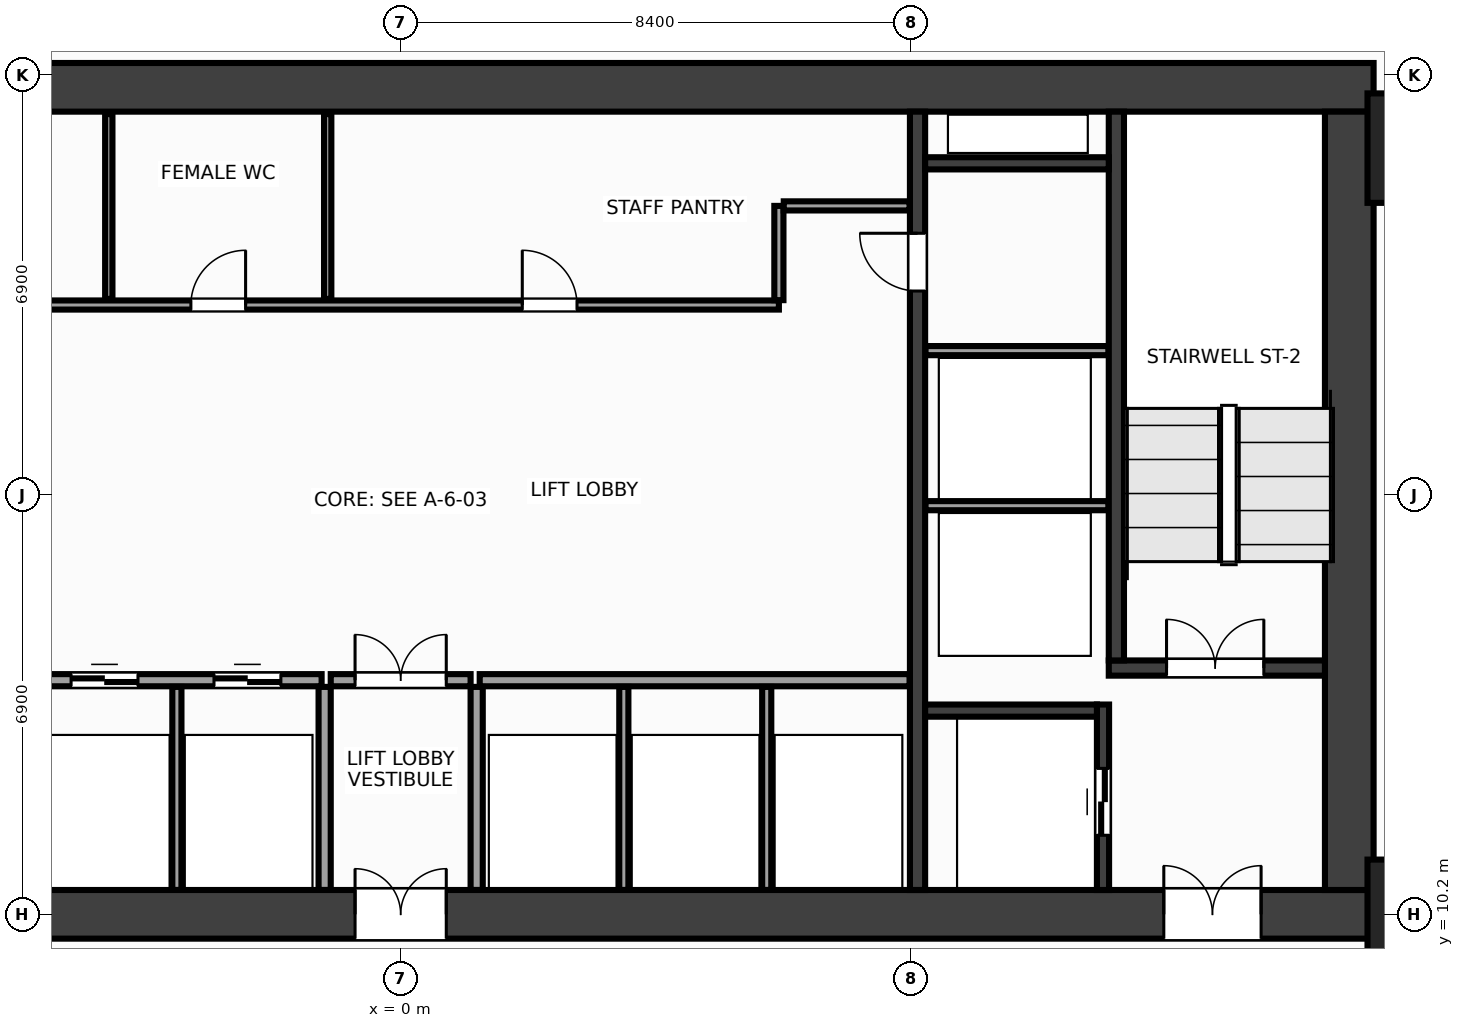
"""IFC4 building model, lengths in metres.
Left out: names, types, materials, properties, quantities, classifications, styles, units other than length and angle.
Written with IfcOpenShell. Run it as: python <this file> out.ifc"""

import sys

from ifc_helpers import new_model, si_unit, direction, frame, frame_2d, origin, origin_2d, place, context, subcontext, project, spatial, rectangle, extrude, source, transform, mapped, element, fill, save


model = new_model("IFC4")
c1 = context("Model", 3, precision=1e-05, world=origin(), true_north=direction((0.0, 1.0)))
c2 = subcontext(c1, "Body", "Model", "MODEL_VIEW")
j1 = project(units=[si_unit("LENGTHUNIT", "METRE"), si_unit("PLANEANGLEUNIT", "RADIAN")], contexts=[c1])
p1 = place(None, origin())
s1 = spatial("IfcSite", under=j1, at=p1, CompositionType="ELEMENT")
p2 = place(p1, origin())
s2 = spatial("IfcBuilding", under=s1, at=p2, CompositionType="ELEMENT")
p3 = place(p2, frame((0.0, 0.0, 30.8)))
s3 = spatial("IfcBuildingStorey", under=s2, at=p3, CompositionType="ELEMENT", Elevation=30.8)
m1 = source(origin(), c2, "Body", "SweptSolid", [
    extrude(rectangle(XDim=32.0, YDim=0.8, at=frame_2d((16.0, 0.0))), origin(), (0.0, 0.0, 1.0), 3.6),
])
p4 = place(p3, frame((-16.0, 23.8, 0.0), z_axis=(0.0, 0.0, 1.0), x_axis=(1.0, 0.0, 0.0)))
e1 = element("IfcWall", 1, at=p4, inside=s3, PredefinedType="SHEAR", context=c2, shape_type="MappedRepresentation", body=[
    mapped(m1, transform((0.0, 0.0, 0.0), x_axis=(1.0, 0.0, 0.0), y_axis=(0.0, 1.0, 0.0), z_axis=(0.0, 0.0, 1.0), scale=1.0)),
])
p5 = place(p3, frame((-16.0, 10.2, 0.0), z_axis=(0.0, 0.0, 1.0), x_axis=(1.0, 0.0, 0.0)))
e2 = element("IfcWall", 2, at=p5, inside=s3, PredefinedType="SHEAR", context=c2, shape_type="MappedRepresentation", body=[
    mapped(m1, transform((0.0, 0.0, 0.0), x_axis=(1.0, 0.0, 0.0), y_axis=(0.0, 1.0, 0.0), z_axis=(0.0, 0.0, 1.0), scale=1.0)),
])
p6 = place(p5, frame((1.85, 0.0, 0.0)))
e3 = element("IfcOpeningElement", 3, at=p6, cuts=e2, PredefinedType="OPENING", context=c2, shape_type="SweptSolid", body=[
    extrude(rectangle(XDim=1.6, YDim=2.15, at=frame_2d((0.8, 1.075))), frame((0.0, 0.412, 0.0), z_axis=(0.0, -1.0, 0.0), x_axis=(1.0, 0.0, 0.0)), (0.0, 0.0, 1.0), 0.824),
])
p7 = place(p5, frame((28.55, 0.0, 0.0)))
e4 = element("IfcOpeningElement", 4, at=p7, cuts=e2, PredefinedType="OPENING", context=c2, shape_type="SweptSolid", body=[
    extrude(rectangle(XDim=1.6, YDim=2.15, at=frame_2d((0.8, 1.075))), frame((0.0, 0.412, 0.0), z_axis=(0.0, -1.0, 0.0), x_axis=(1.0, 0.0, 0.0)), (0.0, 0.0, 1.0), 0.824),
])
p8 = place(p5, frame((15.25, 0.0, 0.0)))
e5 = element("IfcOpeningElement", 5, at=p8, cuts=e2, PredefinedType="OPENING", context=c2, shape_type="SweptSolid", body=[
    extrude(rectangle(XDim=1.5, YDim=2.2, at=frame_2d((0.75, 1.1))), frame((0.0, 0.412, 0.0), z_axis=(0.0, -1.0, 0.0), x_axis=(1.0, 0.0, 0.0)), (0.0, 0.0, 1.0), 0.824),
])
m2 = source(origin(), c2, "Body", "SweptSolid", [
    extrude(rectangle(XDim=12.8, YDim=0.8, at=frame_2d((6.4, 0.0))), origin(), (0.0, 0.0, 1.0), 3.6),
])
p9 = place(p3, frame((15.6, 10.6, 0.0), z_axis=(0.0, 0.0, 1.0), x_axis=(0.0, 1.0, 0.0)))
e6 = element("IfcWall", 6, at=p9, inside=s3, PredefinedType="SHEAR", context=c2, shape_type="MappedRepresentation", body=[
    mapped(m2, transform((0.0, 0.0, 0.0), x_axis=(1.0, 0.0, 0.0), y_axis=(0.0, 1.0, 0.0), z_axis=(0.0, 0.0, 1.0), scale=1.0)),
])
m3 = source(origin(), c2, "Body", "SweptSolid", [
    extrude(rectangle(XDim=12.8, YDim=0.25, at=frame_2d((6.4, 0.0))), origin(), (0.0, 0.0, 1.0), 3.6),
])
p10 = place(p3, frame((8.5, 10.6, 0.0), z_axis=(0.0, 0.0, 1.0), x_axis=(0.0, 1.0, 0.0)))
e7 = element("IfcWall", 7, at=p10, inside=s3, PredefinedType="SHEAR", context=c2, shape_type="MappedRepresentation", body=[
    mapped(m3, transform((0.0, 0.0, 0.0), x_axis=(1.0, 0.0, 0.0), y_axis=(0.0, 1.0, 0.0), z_axis=(0.0, 0.0, 1.0), scale=1.0)),
])
p11 = place(p10, frame((9.85, 0.0, 0.0)))
e8 = element("IfcOpeningElement", 8, at=p11, cuts=e7, PredefinedType="OPENING", context=c2, shape_type="SweptSolid", body=[
    extrude(rectangle(XDim=0.95, YDim=2.15, at=frame_2d((0.475, 1.075))), frame((0.0, 0.137, 0.0), z_axis=(0.0, -1.0, 0.0), x_axis=(1.0, 0.0, 0.0)), (0.0, 0.0, 1.0), 0.274),
])
m4 = source(origin(), c2, "Body", "SweptSolid", [
    extrude(rectangle(XDim=3.555, YDim=0.25, at=frame_2d((1.777, 0.0))), origin(), (0.0, 0.0, 1.0), 3.6),
])
p12 = place(p3, frame((11.645, 14.25, 0.0), z_axis=(0.0, 0.0, 1.0), x_axis=(1.0, 0.0, 0.0)))
e9 = element("IfcWall", 9, at=p12, inside=s3, PredefinedType="SHEAR", context=c2, shape_type="MappedRepresentation", body=[
    mapped(m4, transform((0.0, 0.0, 0.0), x_axis=(1.0, 0.0, 0.0), y_axis=(0.0, 1.0, 0.0), z_axis=(0.0, 0.0, 1.0), scale=1.0)),
])
p13 = place(p12, frame((0.95, 0.0, 0.0)))
e10 = element("IfcOpeningElement", 10, at=p13, cuts=e9, PredefinedType="OPENING", context=c2, shape_type="SweptSolid", body=[
    extrude(rectangle(XDim=1.6, YDim=2.15, at=frame_2d((0.8, 1.075))), frame((0.0, 0.137, 0.0), z_axis=(0.0, -1.0, 0.0), x_axis=(1.0, 0.0, 0.0)), (0.0, 0.0, 1.0), 0.274),
])
m5 = source(origin(), c2, "Body", "SweptSolid", [
    extrude(rectangle(XDim=9.025, YDim=0.25, at=frame_2d((4.512, 0.0))), origin(), (0.0, 0.0, 1.0), 3.6),
])
p14 = place(p3, frame((11.77, 14.375, 0.0), z_axis=(0.0, 0.0, 1.0), x_axis=(0.0, 1.0, 0.0)))
e11 = element("IfcWall", 11, at=p14, inside=s3, PredefinedType="SHEAR", context=c2, shape_type="MappedRepresentation", body=[
    mapped(m5, transform((0.0, 0.0, 0.0), x_axis=(1.0, 0.0, 0.0), y_axis=(0.0, 1.0, 0.0), z_axis=(0.0, 0.0, 1.0), scale=1.0)),
])
m6 = source(origin(), c2, "Body", "SweptSolid", [
    extrude(rectangle(XDim=3.05, YDim=0.2, at=frame_2d((1.525, 0.0))), origin(), (0.0, 0.0, 1.0), 3.6),
])
p15 = place(p3, frame((11.55, 10.6, 0.0), z_axis=(0.0, 0.0, 1.0), x_axis=(0.0, 1.0, 0.0)))
e12 = element("IfcWall", 12, at=p15, inside=s3, PredefinedType="SHEAR", context=c2, shape_type="MappedRepresentation", body=[
    mapped(m6, transform((0.0, 0.0, 0.0), x_axis=(1.0, 0.0, 0.0), y_axis=(0.0, 1.0, 0.0), z_axis=(0.0, 0.0, 1.0), scale=1.0)),
])
p16 = place(p15, frame((0.9, 0.0, 0.0)))
e13 = element("IfcOpeningElement", 13, at=p16, cuts=e12, PredefinedType="OPENING", context=c2, shape_type="SweptSolid", body=[
    extrude(rectangle(XDim=1.1, YDim=2.15, at=frame_2d((0.55, 1.075))), frame((0.0, 0.112, 0.0), z_axis=(0.0, -1.0, 0.0), x_axis=(1.0, 0.0, 0.0)), (0.0, 0.0, 1.0), 0.224),
])
m7 = source(origin(), c2, "Body", "SweptSolid", [
    extrude(rectangle(XDim=2.825, YDim=0.2, at=frame_2d((1.413, 0.0))), origin(), (0.0, 0.0, 1.0), 3.6),
])
p17 = place(p3, frame((8.625, 13.55, 0.0), z_axis=(0.0, 0.0, 1.0), x_axis=(1.0, 0.0, 0.0)))
e14 = element("IfcWall", 14, at=p17, inside=s3, PredefinedType="SHEAR", context=c2, shape_type="MappedRepresentation", body=[
    mapped(m7, transform((0.0, 0.0, 0.0), x_axis=(1.0, 0.0, 0.0), y_axis=(0.0, 1.0, 0.0), z_axis=(0.0, 0.0, 1.0), scale=1.0)),
])
m8 = source(origin(), c2, "Body", "SweptSolid", [
    extrude(rectangle(XDim=3.02, YDim=0.2, at=frame_2d((1.51, 0.0))), origin(), (0.0, 0.0, 1.0), 3.6),
])
p18 = place(p3, frame((8.625, 22.55, 0.0), z_axis=(0.0, 0.0, 1.0), x_axis=(1.0, 0.0, 0.0)))
e15 = element("IfcWall", 15, at=p18, inside=s3, PredefinedType="SHEAR", context=c2, shape_type="MappedRepresentation", body=[
    mapped(m8, transform((0.0, 0.0, 0.0), x_axis=(1.0, 0.0, 0.0), y_axis=(0.0, 1.0, 0.0), z_axis=(0.0, 0.0, 1.0), scale=1.0)),
])
m9 = source(origin(), c2, "Body", "SweptSolid", [
    extrude(rectangle(XDim=1.8, YDim=1.8, at=origin_2d()), origin(), (0.0, 0.0, 1.0), 3.6),
])
for number, where, z_axis, x_axis in (
    (16, (16.8, 10.2, 0.0), (0.0, 0.0, 1.0), (1.0, 0.0, 0.0)),
    (17, (16.8, 22.8, 0.0), (0.0, 0.0, 1.0), (1.0, 0.0, 0.0)),
):
    element("IfcColumn", number, at=place(p3, frame(where, z_axis=z_axis, x_axis=x_axis)), inside=s3, PredefinedType="COLUMN", context=c2, shape_type="MappedRepresentation", body=[
        mapped(m9, transform((0.0, 0.0, 0.0), x_axis=(1.0, 0.0, 0.0), y_axis=(0.0, 1.0, 0.0), z_axis=(0.0, 0.0, 1.0), scale=1.0)),
    ])
m10 = source(origin(), c2, "Body", "SweptSolid", [
    extrude(rectangle(XDim=3.01, YDim=0.15, at=frame_2d((1.505, 0.0))), origin(), (0.0, 0.0, 1.0), 3.36),
])
for number, where, z_axis, x_axis in (
    (18, (8.63, 16.92, 0.0), (0.0, 0.0, 1.0), (1.0, 0.0, 0.0)),
    (19, (8.63, 19.47, 0.0), (0.0, 0.0, 1.0), (1.0, 0.0, 0.0)),
):
    element("IfcWall", number, at=place(p3, frame(where, z_axis=z_axis, x_axis=x_axis)), inside=s3, PredefinedType="PARTITIONING", context=c2, shape_type="MappedRepresentation", body=[
        mapped(m10, transform((0.0, 0.0, 0.0), x_axis=(1.0, 0.0, 0.0), y_axis=(0.0, 1.0, 0.0), z_axis=(0.0, 0.0, 1.0), scale=1.0)),
    ])
m11 = source(origin(), c2, "Body", "SweptSolid", [
    extrude(rectangle(XDim=7.07, YDim=0.2, at=frame_2d((3.535, 0.0))), origin(), (0.0, 0.0, 1.0), 3.36),
])
p19 = place(p3, frame((-8.37, 14.05, 0.0), z_axis=(0.0, 0.0, 1.0), x_axis=(1.0, 0.0, 0.0)))
e20 = element("IfcWall", 20, at=p19, inside=s3, PredefinedType="PARTITIONING", context=c2, shape_type="MappedRepresentation", body=[
    mapped(m11, transform((0.0, 0.0, 0.0), x_axis=(1.0, 0.0, 0.0), y_axis=(0.0, 1.0, 0.0), z_axis=(0.0, 0.0, 1.0), scale=1.0)),
])
p20 = place(p19, frame((0.6, 0.0, 0.0)))
e21 = element("IfcOpeningElement", 21, at=p20, cuts=e20, PredefinedType="OPENING", context=c2, shape_type="SweptSolid", body=[
    extrude(rectangle(XDim=1.1, YDim=2.15, at=frame_2d((0.55, 1.075))), frame((0.0, 0.112, 0.0), z_axis=(0.0, -1.0, 0.0), x_axis=(1.0, 0.0, 0.0)), (0.0, 0.0, 1.0), 0.224),
])
p21 = place(p19, frame((2.95, 0.0, 0.0)))
e22 = element("IfcOpeningElement", 22, at=p21, cuts=e20, PredefinedType="OPENING", context=c2, shape_type="SweptSolid", body=[
    extrude(rectangle(XDim=1.1, YDim=2.15, at=frame_2d((0.55, 1.075))), frame((0.0, 0.112, 0.0), z_axis=(0.0, -1.0, 0.0), x_axis=(1.0, 0.0, 0.0)), (0.0, 0.0, 1.0), 0.224),
])
p22 = place(p19, frame((5.3, 0.0, 0.0)))
e23 = element("IfcOpeningElement", 23, at=p22, cuts=e20, PredefinedType="OPENING", context=c2, shape_type="SweptSolid", body=[
    extrude(rectangle(XDim=1.1, YDim=2.15, at=frame_2d((0.55, 1.075))), frame((0.0, 0.112, 0.0), z_axis=(0.0, -1.0, 0.0), x_axis=(1.0, 0.0, 0.0)), (0.0, 0.0, 1.0), 0.224),
])
p23 = place(p3, frame((1.3, 14.05, 0.0), z_axis=(0.0, 0.0, 1.0), x_axis=(1.0, 0.0, 0.0)))
e24 = element("IfcWall", 24, at=p23, inside=s3, PredefinedType="PARTITIONING", context=c2, shape_type="MappedRepresentation", body=[
    mapped(m11, transform((0.0, 0.0, 0.0), x_axis=(1.0, 0.0, 0.0), y_axis=(0.0, 1.0, 0.0), z_axis=(0.0, 0.0, 1.0), scale=1.0)),
])
m12 = source(origin(), c2, "Body", "SweptSolid", [
    extrude(rectangle(XDim=3.34, YDim=0.2, at=frame_2d((1.67, 0.0))), origin(), (0.0, 0.0, 1.0), 3.36),
])
for number, where, z_axis, x_axis in (
    (25, (-1.25, 10.6, 0.0), (0.0, 0.0, 1.0), (0.0, 1.0, 0.0)),
    (26, (1.25, 10.6, 0.0), (0.0, 0.0, 1.0), (0.0, 1.0, 0.0)),
):
    element("IfcWall", number, at=place(p3, frame(where, z_axis=z_axis, x_axis=x_axis)), inside=s3, PredefinedType="PARTITIONING", context=c2, shape_type="MappedRepresentation", body=[
        mapped(m12, transform((0.0, 0.0, 0.0), x_axis=(1.0, 0.0, 0.0), y_axis=(0.0, 1.0, 0.0), z_axis=(0.0, 0.0, 1.0), scale=1.0)),
    ])
m13 = source(origin(), c2, "Body", "SweptSolid", [
    extrude(rectangle(XDim=2.3, YDim=0.2, at=frame_2d((1.15, 0.0))), origin(), (0.0, 0.0, 1.0), 3.36),
])
p24 = place(p3, frame((-1.15, 14.05, 0.0), z_axis=(0.0, 0.0, 1.0), x_axis=(1.0, 0.0, 0.0)))
e27 = element("IfcWall", 27, at=p24, inside=s3, PredefinedType="PARTITIONING", context=c2, shape_type="MappedRepresentation", body=[
    mapped(m13, transform((0.0, 0.0, 0.0), x_axis=(1.0, 0.0, 0.0), y_axis=(0.0, 1.0, 0.0), z_axis=(0.0, 0.0, 1.0), scale=1.0)),
])
p25 = place(p24, frame((0.4, 0.0, 0.0)))
e28 = element("IfcOpeningElement", 28, at=p25, cuts=e27, PredefinedType="OPENING", context=c2, shape_type="SweptSolid", body=[
    extrude(rectangle(XDim=1.5, YDim=2.2, at=frame_2d((0.75, 1.1))), frame((0.0, 0.112, 0.0), z_axis=(0.0, -1.0, 0.0), x_axis=(1.0, 0.0, 0.0)), (0.0, 0.0, 1.0), 0.224),
])
m14 = source(origin(), c2, "Body", "SweptSolid", [
    extrude(rectangle(XDim=14.59, YDim=0.15, at=frame_2d((7.295, 0.0))), origin(), (0.0, 0.0, 1.0), 3.36),
])
p26 = place(p3, frame((-8.37, 20.22, 0.0), z_axis=(0.0, 0.0, 1.0), x_axis=(1.0, 0.0, 0.0)))
e29 = element("IfcWall", 29, at=p26, inside=s3, PredefinedType="PARTITIONING", context=c2, shape_type="MappedRepresentation", body=[
    mapped(m14, transform((0.0, 0.0, 0.0), x_axis=(1.0, 0.0, 0.0), y_axis=(0.0, 1.0, 0.0), z_axis=(0.0, 0.0, 1.0), scale=1.0)),
])
p27 = place(p26, frame((1.36, 0.0, 0.0)))
e30 = element("IfcOpeningElement", 30, at=p27, cuts=e29, PredefinedType="OPENING", context=c2, shape_type="SweptSolid", body=[
    extrude(rectangle(XDim=0.9, YDim=2.15, at=frame_2d((0.45, 1.075))), frame((0.0, 0.087, 0.0), z_axis=(0.0, -1.0, 0.0), x_axis=(1.0, 0.0, 0.0)), (0.0, 0.0, 1.0), 0.174),
])
p28 = place(p26, frame((4.92, 0.0, 0.0)))
e31 = element("IfcOpeningElement", 31, at=p28, cuts=e29, PredefinedType="OPENING", context=c2, shape_type="SweptSolid", body=[
    extrude(rectangle(XDim=0.9, YDim=2.15, at=frame_2d((0.45, 1.075))), frame((0.0, 0.087, 0.0), z_axis=(0.0, -1.0, 0.0), x_axis=(1.0, 0.0, 0.0)), (0.0, 0.0, 1.0), 0.174),
])
p29 = place(p26, frame((10.37, 0.0, 0.0)))
e32 = element("IfcOpeningElement", 32, at=p29, cuts=e29, PredefinedType="OPENING", context=c2, shape_type="SweptSolid", body=[
    extrude(rectangle(XDim=0.9, YDim=2.15, at=frame_2d((0.45, 1.075))), frame((0.0, 0.087, 0.0), z_axis=(0.0, -1.0, 0.0), x_axis=(1.0, 0.0, 0.0)), (0.0, 0.0, 1.0), 0.174),
])
m15 = source(origin(), c2, "Body", "SweptSolid", [
    extrude(rectangle(XDim=1.55, YDim=0.15, at=frame_2d((0.775, 0.0))), origin(), (0.0, 0.0, 1.0), 3.36),
])
p30 = place(p3, frame((6.22, 20.3, 0.0), z_axis=(0.0, 0.0, 1.0), x_axis=(0.0, 1.0, 0.0)))
e33 = element("IfcWall", 33, at=p30, inside=s3, PredefinedType="PARTITIONING", context=c2, shape_type="MappedRepresentation", body=[
    mapped(m15, transform((0.0, 0.0, 0.0), x_axis=(1.0, 0.0, 0.0), y_axis=(0.0, 1.0, 0.0), z_axis=(0.0, 0.0, 1.0), scale=1.0)),
])
m16 = source(origin(), c2, "Body", "SweptSolid", [
    extrude(rectangle(XDim=2.07, YDim=0.15, at=frame_2d((1.035, 0.0))), origin(), (0.0, 0.0, 1.0), 3.36),
])
p31 = place(p3, frame((6.3, 21.85, 0.0), z_axis=(0.0, 0.0, 1.0), x_axis=(1.0, 0.0, 0.0)))
e34 = element("IfcWall", 34, at=p31, inside=s3, PredefinedType="PARTITIONING", context=c2, shape_type="MappedRepresentation", body=[
    mapped(m16, transform((0.0, 0.0, 0.0), x_axis=(1.0, 0.0, 0.0), y_axis=(0.0, 1.0, 0.0), z_axis=(0.0, 0.0, 1.0), scale=1.0)),
])
m17 = source(origin(), c2, "Body", "SweptSolid", [
    extrude(rectangle(XDim=3.34, YDim=0.15, at=frame_2d((1.67, 0.0))), origin(), (0.0, 0.0, 1.0), 3.36),
])
for number, where, z_axis, x_axis in (
    (35, (-3.68, 10.6, 0.0), (0.0, 0.0, 1.0), (0.0, 1.0, 0.0)),
    (36, (3.67, 10.6, 0.0), (0.0, 0.0, 1.0), (0.0, 1.0, 0.0)),
    (37, (6.02, 10.6, 0.0), (0.0, 0.0, 1.0), (0.0, 1.0, 0.0)),
):
    element("IfcWall", number, at=place(p3, frame(where, z_axis=z_axis, x_axis=x_axis)), inside=s3, PredefinedType="PARTITIONING", context=c2, shape_type="MappedRepresentation", body=[
        mapped(m17, transform((0.0, 0.0, 0.0), x_axis=(1.0, 0.0, 0.0), y_axis=(0.0, 1.0, 0.0), z_axis=(0.0, 0.0, 1.0), scale=1.0)),
    ])
m18 = source(origin(), c2, "Body", "SweptSolid", [
    extrude(rectangle(XDim=3.04, YDim=0.12, at=frame_2d((1.52, 0.0))), origin(), (0.0, 0.0, 1.0), 3.36),
])
for number, where, z_axis, x_axis in (
    (38, (-4.8, 20.32, 0.0), (0.0, 0.0, 1.0), (0.0, 1.0, 0.0)),
    (39, (-1.2, 20.32, 0.0), (0.0, 0.0, 1.0), (0.0, 1.0, 0.0)),
):
    element("IfcWall", number, at=place(p3, frame(where, z_axis=z_axis, x_axis=x_axis)), inside=s3, PredefinedType="PARTITIONING", context=c2, shape_type="MappedRepresentation", body=[
        mapped(m18, transform((0.0, 0.0, 0.0), x_axis=(1.0, 0.0, 0.0), y_axis=(0.0, 1.0, 0.0), z_axis=(0.0, 0.0, 1.0), scale=1.0)),
    ])
m19 = source(origin(), c2, "Body", "SweptSolid", [
    extrude(rectangle(XDim=1.6, YDim=2.15, at=frame_2d((0.8, 1.075))), frame((0.0, 0.025, 0.0), z_axis=(0.0, -1.0, 0.0), x_axis=(1.0, 0.0, 0.0)), (0.0, 0.0, 1.0), 0.05),
])
p32 = place(p13, origin())
e40 = element("IfcDoor", 40, at=p32, inside=s3, OperationType="DOUBLE_DOOR_SINGLE_SWING", PredefinedType="DOOR", context=c2, shape_type="MappedRepresentation", body=[
    mapped(m19, transform((0.0, 0.0, 0.0), x_axis=(1.0, 0.0, 0.0), y_axis=(0.0, 1.0, 0.0), z_axis=(0.0, 0.0, 1.0), scale=1.0)),
])
fill(e10, e40)
p33 = place(p7, origin())
e41 = element("IfcDoor", 41, at=p33, inside=s3, OperationType="DOUBLE_DOOR_SINGLE_SWING", PredefinedType="DOOR", context=c2, shape_type="MappedRepresentation", body=[
    mapped(m19, transform((0.0, 0.0, 0.0), x_axis=(1.0, 0.0, 0.0), y_axis=(0.0, 1.0, 0.0), z_axis=(0.0, 0.0, 1.0), scale=1.0)),
])
fill(e4, e41)
m20 = source(origin(), c2, "Body", "SweptSolid", [
    extrude(rectangle(XDim=1.1, YDim=2.15, at=frame_2d((0.55, 1.075))), frame((0.0, 0.025, 0.0), z_axis=(0.0, -1.0, 0.0), x_axis=(1.0, 0.0, 0.0)), (0.0, 0.0, 1.0), 0.05),
])
p34 = place(p16, origin())
e42 = element("IfcDoor", 42, at=p34, inside=s3, OperationType="DOUBLE_DOOR_SLIDING", PredefinedType="DOOR", context=c2, shape_type="MappedRepresentation", body=[
    mapped(m20, transform((0.0, 0.0, 0.0), x_axis=(1.0, 0.0, 0.0), y_axis=(0.0, 1.0, 0.0), z_axis=(0.0, 0.0, 1.0), scale=1.0)),
])
fill(e13, e42)
m21 = source(origin(), c2, "Body", "SweptSolid", [
    extrude(rectangle(XDim=0.95, YDim=2.15, at=frame_2d((0.475, 1.075))), frame((0.0, 0.025, 0.0), z_axis=(0.0, -1.0, 0.0), x_axis=(1.0, 0.0, 0.0)), (0.0, 0.0, 1.0), 0.05),
])
p35 = place(p11, origin())
e43 = element("IfcDoor", 43, at=p35, inside=s3, OperationType="SINGLE_SWING_RIGHT", PredefinedType="DOOR", context=c2, shape_type="MappedRepresentation", body=[
    mapped(m21, transform((0.0, 0.0, 0.0), x_axis=(1.0, 0.0, 0.0), y_axis=(0.0, 1.0, 0.0), z_axis=(0.0, 0.0, 1.0), scale=1.0)),
])
fill(e8, e43)
p36 = place(p21, origin())
e44 = element("IfcDoor", 44, at=p36, inside=s3, OperationType="DOUBLE_DOOR_SLIDING", PredefinedType="DOOR", context=c2, shape_type="MappedRepresentation", body=[
    mapped(m20, transform((0.0, 0.0, 0.0), x_axis=(1.0, 0.0, 0.0), y_axis=(0.0, 1.0, 0.0), z_axis=(0.0, 0.0, 1.0), scale=1.0)),
])
fill(e22, e44)
p37 = place(p22, origin())
e45 = element("IfcDoor", 45, at=p37, inside=s3, OperationType="DOUBLE_DOOR_SLIDING", PredefinedType="DOOR", context=c2, shape_type="MappedRepresentation", body=[
    mapped(m20, transform((0.0, 0.0, 0.0), x_axis=(1.0, 0.0, 0.0), y_axis=(0.0, 1.0, 0.0), z_axis=(0.0, 0.0, 1.0), scale=1.0)),
])
fill(e23, e45)
m22 = source(origin(), c2, "Body", "SweptSolid", [
    extrude(rectangle(XDim=1.5, YDim=2.2, at=frame_2d((0.75, 1.1))), frame((0.0, 0.025, 0.0), z_axis=(0.0, -1.0, 0.0), x_axis=(1.0, 0.0, 0.0)), (0.0, 0.0, 1.0), 0.05),
])
p38 = place(p25, origin())
e46 = element("IfcDoor", 46, at=p38, inside=s3, OperationType="DOUBLE_DOOR_SINGLE_SWING", PredefinedType="DOOR", context=c2, shape_type="MappedRepresentation", body=[
    mapped(m22, transform((0.0, 0.0, 0.0), x_axis=(1.0, 0.0, 0.0), y_axis=(0.0, 1.0, 0.0), z_axis=(0.0, 0.0, 1.0), scale=1.0)),
])
fill(e28, e46)
p39 = place(p8, origin())
e47 = element("IfcDoor", 47, at=p39, inside=s3, OperationType="DOUBLE_DOOR_SINGLE_SWING", PredefinedType="DOOR", context=c2, shape_type="MappedRepresentation", body=[
    mapped(m22, transform((0.0, 0.0, 0.0), x_axis=(1.0, 0.0, 0.0), y_axis=(0.0, 1.0, 0.0), z_axis=(0.0, 0.0, 1.0), scale=1.0)),
])
fill(e5, e47)
m23 = source(origin(), c2, "Body", "SweptSolid", [
    extrude(rectangle(XDim=0.9, YDim=2.15, at=frame_2d((0.45, 1.075))), frame((0.0, 0.025, 0.0), z_axis=(0.0, -1.0, 0.0), x_axis=(1.0, 0.0, 0.0)), (0.0, 0.0, 1.0), 0.05),
])
p40 = place(p28, origin())
e48 = element("IfcDoor", 48, at=p40, inside=s3, OperationType="SINGLE_SWING_RIGHT", PredefinedType="DOOR", context=c2, shape_type="MappedRepresentation", body=[
    mapped(m23, transform((0.0, 0.0, 0.0), x_axis=(1.0, 0.0, 0.0), y_axis=(0.0, 1.0, 0.0), z_axis=(0.0, 0.0, 1.0), scale=1.0)),
])
fill(e31, e48)
p41 = place(p29, origin())
e49 = element("IfcDoor", 49, at=p41, inside=s3, OperationType="SINGLE_SWING_LEFT", PredefinedType="DOOR", context=c2, shape_type="MappedRepresentation", body=[
    mapped(m23, transform((0.0, 0.0, 0.0), x_axis=(1.0, 0.0, 0.0), y_axis=(0.0, 1.0, 0.0), z_axis=(0.0, 0.0, 1.0), scale=1.0)),
])
fill(e32, e49)
save(model, sys.argv[1])
